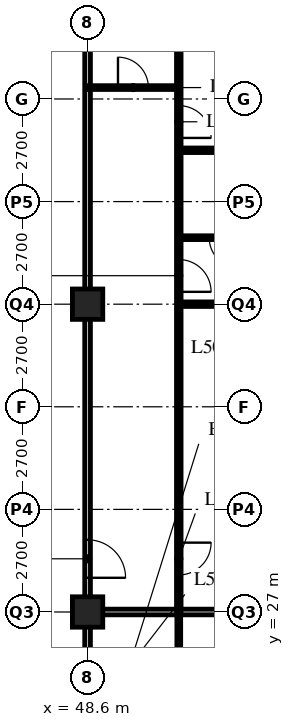
"""IFC4 building model, lengths in metres.
Left out: names, types, materials, properties, quantities, classifications, styles, units other than length and angle.
Written with IfcOpenShell. Run it as: python <this file> out.ifc"""

import sys

from ifc_helpers import new_model, si_unit, direction, frame, frame_2d, origin, origin_2d, place, context, subcontext, project, spatial, rectangle, hollow_rectangle, extrude, element, fill, save


model = new_model("IFC4")
c1 = context("Model", 3, precision=1e-05, world=origin(), true_north=direction((0.0, 1.0)))
c2 = subcontext(c1, "Body", "Model", "MODEL_VIEW")
j1 = project(units=[si_unit("LENGTHUNIT", "METRE"), si_unit("PLANEANGLEUNIT", "RADIAN")], contexts=[c1])
p1 = place(None, origin())
s1 = spatial("IfcSite", under=j1, at=p1, CompositionType="ELEMENT")
p2 = place(p1, origin())
s2 = spatial("IfcBuilding", under=s1, at=p2, CompositionType="ELEMENT")
p3 = place(p2, frame((0.0, 0.0, 195.6)))
s3 = spatial("IfcBuildingStorey", under=s2, at=p3, CompositionType="ELEMENT", Elevation=195.6)
for number, where, z_axis, x_axis in (
    (1, (48.6, 27.0, 0.0), (0.0, 0.0, 1.0), (1.0, 0.0, 0.0)),
    (2, (48.6, 35.1, 0.0), (0.0, 0.0, 1.0), (1.0, 0.0, 0.0)),
):
    element("IfcColumn", number, at=place(p3, frame(where, z_axis=z_axis, x_axis=x_axis)), inside=s3, PredefinedType="COLUMN", context=c2, shape_type="SweptSolid", body=[
        extrude(hollow_rectangle(XDim=0.8, YDim=0.8, WallThickness=0.08, at=origin_2d()), origin(), (0.0, 0.0, 1.0), 3.6),
    ])
p4 = place(p3, frame((48.6, 18.9, 0.0), z_axis=(0.0, 0.0, 1.0), x_axis=(0.0, 1.0, 0.0)))
e3 = element("IfcWall", 3, at=p4, inside=s3, PredefinedType="PARTITIONING", context=c2, shape_type="SweptSolid", body=[
    extrude(rectangle(XDim=24.3, YDim=0.15, at=frame_2d((12.15, 0.0))), origin(), (0.0, 0.0, 1.0), 2.778),
])
p5 = place(p4, frame((2.35, 0.0, 0.0)))
e4 = element("IfcOpeningElement", 4, at=p5, cuts=e3, PredefinedType="OPENING", context=c2, shape_type="SweptSolid", body=[
    extrude(rectangle(XDim=1.0, YDim=2.1, at=frame_2d((0.5, 1.05))), frame((0.0, 0.085, 0.0), z_axis=(0.0, -1.0, 0.0), x_axis=(1.0, 0.0, 0.0)), (0.0, 0.0, 1.0), 0.17),
])
p6 = place(p4, frame((4.75, 0.0, 0.0)))
e5 = element("IfcOpeningElement", 5, at=p6, cuts=e3, PredefinedType="OPENING", context=c2, shape_type="SweptSolid", body=[
    extrude(rectangle(XDim=1.0, YDim=2.1, at=frame_2d((0.5, 1.05))), frame((0.0, 0.085, 0.0), z_axis=(0.0, -1.0, 0.0), x_axis=(1.0, 0.0, 0.0)), (0.0, 0.0, 1.0), 0.17),
])
p7 = place(p4, frame((9.0, 0.0, 0.0)))
e6 = element("IfcOpeningElement", 6, at=p7, cuts=e3, PredefinedType="OPENING", context=c2, shape_type="SweptSolid", body=[
    extrude(rectangle(XDim=1.0, YDim=2.1, at=frame_2d((0.5, 1.05))), frame((0.0, 0.085, 0.0), z_axis=(0.0, -1.0, 0.0), x_axis=(1.0, 0.0, 0.0)), (0.0, 0.0, 1.0), 0.17),
])
p8 = place(p3, frame((51.0, 24.8, 0.0), z_axis=(0.0, 0.0, 1.0), x_axis=(0.0, 1.0, 0.0)))
e7 = element("IfcWall", 7, at=p8, inside=s3, PredefinedType="PARTITIONING", context=c2, shape_type="SweptSolid", body=[
    extrude(rectangle(XDim=2.2, YDim=0.1, at=frame_2d((1.1, 0.0))), origin(), (0.0, 0.0, 1.0), 3.39),
])
p9 = place(p3, frame((48.6, 27.0, 0.0), z_axis=(0.0, 0.0, 1.0), x_axis=(1.0, 0.0, 0.0)))
e8 = element("IfcWall", 8, at=p9, inside=s3, PredefinedType="PARTITIONING", context=c2, shape_type="SweptSolid", body=[
    extrude(rectangle(XDim=7.8, YDim=0.15, at=frame_2d((3.9, 0.0))), origin(), (0.0, 0.0, 1.0), 2.778),
])
p10 = place(p3, frame((51.0, 27.0, 0.0), z_axis=(0.0, 0.0, 1.0), x_axis=(0.0, 1.0, 0.0)))
e9 = element("IfcWall", 9, at=p10, inside=s3, PredefinedType="PARTITIONING", context=c2, shape_type="SweptSolid", body=[
    extrude(rectangle(XDim=16.2, YDim=0.12, at=frame_2d((8.1, 0.0))), origin(), (0.0, 0.0, 1.0), 3.39),
])
p11 = place(p10, frame((0.975, 0.0, 0.0)))
e10 = element("IfcOpeningElement", 10, at=p11, cuts=e9, PredefinedType="OPENING", context=c2, shape_type="SweptSolid", body=[
    extrude(rectangle(XDim=0.85, YDim=2.1, at=frame_2d((0.425, 1.05))), frame((0.0, 0.07, 0.0), z_axis=(0.0, -1.0, 0.0), x_axis=(1.0, 0.0, 0.0)), (0.0, 0.0, 1.0), 0.14),
])
p12 = place(p10, frame((8.425, 0.0, 0.0)))
e11 = element("IfcOpeningElement", 11, at=p12, cuts=e9, PredefinedType="OPENING", context=c2, shape_type="SweptSolid", body=[
    extrude(rectangle(XDim=0.85, YDim=2.1, at=frame_2d((0.425, 1.05))), frame((0.0, 0.07, 0.0), z_axis=(0.0, -1.0, 0.0), x_axis=(1.0, 0.0, 0.0)), (0.0, 0.0, 1.0), 0.14),
])
p13 = place(p10, frame((12.475, 0.0, 0.0)))
e12 = element("IfcOpeningElement", 12, at=p13, cuts=e9, PredefinedType="OPENING", context=c2, shape_type="SweptSolid", body=[
    extrude(rectangle(XDim=0.85, YDim=2.1, at=frame_2d((0.425, 1.05))), frame((0.0, 0.07, 0.0), z_axis=(0.0, -1.0, 0.0), x_axis=(1.0, 0.0, 0.0)), (0.0, 0.0, 1.0), 0.14),
])
p14 = place(p3, frame((48.6, 40.8, 0.0), z_axis=(0.0, 0.0, 1.0), x_axis=(1.0, 0.0, 0.0)))
e13 = element("IfcWall", 13, at=p14, inside=s3, PredefinedType="PARTITIONING", context=c2, shape_type="SweptSolid", body=[
    extrude(rectangle(XDim=2.4, YDim=0.1, at=frame_2d((1.2, 0.0))), origin(), (0.0, 0.0, 1.0), 3.39),
])
p15 = place(p14, frame((0.8, 0.0, 0.0)))
e14 = element("IfcOpeningElement", 14, at=p15, cuts=e13, PredefinedType="OPENING", context=c2, shape_type="SweptSolid", body=[
    extrude(rectangle(XDim=0.8, YDim=2.1, at=frame_2d((0.4, 1.05))), frame((0.0, 0.06, 0.0), z_axis=(0.0, -1.0, 0.0), x_axis=(1.0, 0.0, 0.0)), (0.0, 0.0, 1.0), 0.12),
])
p16 = place(p3, frame((51.0, 36.85, 0.0), z_axis=(0.0, 0.0, 1.0), x_axis=(1.0, 0.0, 0.0)))
e15 = element("IfcWall", 15, at=p16, inside=s3, PredefinedType="PARTITIONING", context=c2, shape_type="SweptSolid", body=[
    extrude(rectangle(XDim=2.4, YDim=0.1, at=frame_2d((1.2, 0.0))), origin(), (0.0, 0.0, 1.0), 3.39),
])
p17 = place(p16, frame((0.8, 0.0, 0.0)))
e16 = element("IfcOpeningElement", 16, at=p17, cuts=e15, PredefinedType="OPENING", context=c2, shape_type="SweptSolid", body=[
    extrude(rectangle(XDim=0.8, YDim=2.1, at=frame_2d((0.4, 1.05))), frame((0.0, 0.06, 0.0), z_axis=(0.0, -1.0, 0.0), x_axis=(1.0, 0.0, 0.0)), (0.0, 0.0, 1.0), 0.12),
])
p18 = place(p3, frame((51.0, 35.1, 0.0), z_axis=(0.0, 0.0, 1.0), x_axis=(1.0, 0.0, 0.0)))
e17 = element("IfcWall", 17, at=p18, inside=s3, PredefinedType="PARTITIONING", context=c2, shape_type="SweptSolid", body=[
    extrude(rectangle(XDim=5.4, YDim=0.12, at=frame_2d((2.7, 0.0))), origin(), (0.0, 0.0, 1.0), 2.778),
])
p19 = place(p3, frame((51.0, 39.15, 0.0), z_axis=(0.0, 0.0, 1.0), x_axis=(1.0, 0.0, 0.0)))
e18 = element("IfcWall", 18, at=p19, inside=s3, PredefinedType="PARTITIONING", context=c2, shape_type="SweptSolid", body=[
    extrude(rectangle(XDim=5.4, YDim=0.12, at=frame_2d((2.7, 0.0))), origin(), (0.0, 0.0, 1.0), 3.39),
])
p20 = place(p15, origin())
e19 = element("IfcDoor", 19, at=p20, inside=s3, OperationType="SINGLE_SWING_LEFT", PredefinedType="DOOR", context=c2, shape_type="SweptSolid", body=[
    extrude(rectangle(XDim=0.8, YDim=2.1, at=frame_2d((0.4, 1.05))), frame((0.0, 0.025, 0.0), z_axis=(0.0, -1.0, 0.0), x_axis=(1.0, 0.0, 0.0)), (0.0, 0.0, 1.0), 0.05),
])
fill(e14, e19)
p21 = place(p7, origin())
e20 = element("IfcDoor", 20, at=p21, inside=s3, OperationType="SINGLE_SWING_RIGHT", PredefinedType="DOOR", context=c2, shape_type="SweptSolid", body=[
    extrude(rectangle(XDim=1.0, YDim=2.1, at=frame_2d((0.5, 1.05))), frame((0.0, 0.025, 0.0), z_axis=(0.0, -1.0, 0.0), x_axis=(1.0, 0.0, 0.0)), (0.0, 0.0, 1.0), 0.05),
])
fill(e6, e20)
p22 = place(p11, origin())
e21 = element("IfcDoor", 21, at=p22, inside=s3, OperationType="SINGLE_SWING_LEFT", PredefinedType="DOOR", context=c2, shape_type="SweptSolid", body=[
    extrude(rectangle(XDim=0.85, YDim=2.1, at=frame_2d((0.425, 1.05))), frame((0.0, 0.025, 0.0), z_axis=(0.0, -1.0, 0.0), x_axis=(1.0, 0.0, 0.0)), (0.0, 0.0, 1.0), 0.05),
])
fill(e10, e21)
p23 = place(p17, origin())
e22 = element("IfcDoor", 22, at=p23, inside=s3, OperationType="SINGLE_SWING_LEFT", PredefinedType="DOOR", context=c2, shape_type="SweptSolid", body=[
    extrude(rectangle(XDim=0.8, YDim=2.1, at=frame_2d((0.4, 1.05))), frame((0.0, 0.025, 0.0), z_axis=(0.0, -1.0, 0.0), x_axis=(1.0, 0.0, 0.0)), (0.0, 0.0, 1.0), 0.05),
])
fill(e16, e22)
p24 = place(p12, origin())
e23 = element("IfcDoor", 23, at=p24, inside=s3, OperationType="SINGLE_SWING_RIGHT", PredefinedType="DOOR", context=c2, shape_type="SweptSolid", body=[
    extrude(rectangle(XDim=0.85, YDim=2.1, at=frame_2d((0.425, 1.05))), frame((0.0, 0.025, 0.0), z_axis=(0.0, -1.0, 0.0), x_axis=(1.0, 0.0, 0.0)), (0.0, 0.0, 1.0), 0.05),
])
fill(e11, e23)
p25 = place(p13, origin())
e24 = element("IfcDoor", 24, at=p25, inside=s3, OperationType="SINGLE_SWING_RIGHT", PredefinedType="DOOR", context=c2, shape_type="SweptSolid", body=[
    extrude(rectangle(XDim=0.85, YDim=2.1, at=frame_2d((0.425, 1.05))), frame((0.0, 0.025, 0.0), z_axis=(0.0, -1.0, 0.0), x_axis=(1.0, 0.0, 0.0)), (0.0, 0.0, 1.0), 0.05),
])
fill(e12, e24)
save(model, sys.argv[1])
